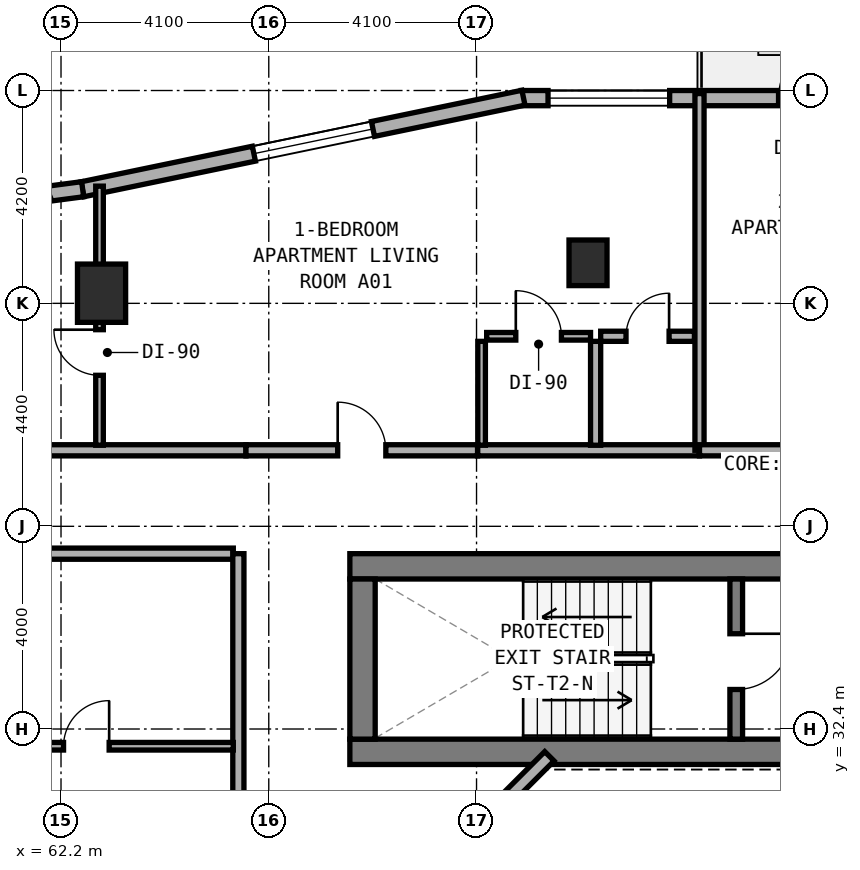
"""IFC4 building model, lengths in metres.
Left out: names, types, materials, properties, quantities, classifications, styles, units other than length and angle.
Written with IfcOpenShell. Run it as: python <this file> out.ifc"""

import sys

from ifc_helpers import new_model, si_unit, direction, frame, frame_2d, origin, origin_2d, place, context, subcontext, project, spatial, rectangle, extrude, element, fill, save


model = new_model("IFC4")
c1 = context("Model", 3, precision=1e-05, world=origin(), true_north=direction((0.0, 1.0)))
c2 = subcontext(c1, "Body", "Model", "MODEL_VIEW")
j1 = project(units=[si_unit("LENGTHUNIT", "METRE"), si_unit("PLANEANGLEUNIT", "RADIAN")], contexts=[c1])
p1 = place(None, origin())
s1 = spatial("IfcSite", under=j1, at=p1, CompositionType="ELEMENT")
p2 = place(p1, origin())
s2 = spatial("IfcBuilding", under=s1, at=p2, CompositionType="ELEMENT")
p3 = place(p2, frame((0.0, 0.0, 59.0)))
s3 = spatial("IfcBuildingStorey", under=s2, at=p3, CompositionType="ELEMENT", Elevation=59.0)
p4 = place(p3, frame((67.9, 31.95, 0.0), z_axis=(0.0, 0.0, 1.0), x_axis=(1.0, 0.0, 0.0)))
e1 = element("IfcWall", 1, at=p4, inside=s3, PredefinedType="SHEAR", context=c2, shape_type="SweptSolid", body=[
    extrude(rectangle(XDim=18.4, YDim=0.5, at=frame_2d((9.2, 0.0))), origin(), (0.0, 0.0, 1.0), 3.5),
])
p5 = place(p3, frame((67.9, 35.61, 0.0), z_axis=(0.0, 0.0, 1.0), x_axis=(1.0, 0.0, 0.0)))
e2 = element("IfcWall", 2, at=p5, inside=s3, PredefinedType="SHEAR", context=c2, shape_type="SweptSolid", body=[
    extrude(rectangle(XDim=18.4, YDim=0.5, at=frame_2d((9.2, 0.0))), origin(), (0.0, 0.0, 1.0), 3.5),
])
p6 = place(p5, frame((9.25, 0.0, 0.0)))
e3 = element("IfcOpeningElement", 3, at=p6, cuts=e2, PredefinedType="OPENING", context=c2, shape_type="SweptSolid", body=[
    extrude(rectangle(XDim=1.2, YDim=2.15, at=frame_2d((0.6, 1.075))), frame((0.0, 0.26, 0.0), z_axis=(0.0, -1.0, 0.0), x_axis=(1.0, 0.0, 0.0)), (0.0, 0.0, 1.0), 0.52),
])
p7 = place(p5, frame((16.85, 0.0, 0.0)))
e4 = element("IfcOpeningElement", 4, at=p7, cuts=e2, PredefinedType="OPENING", context=c2, shape_type="SweptSolid", body=[
    extrude(rectangle(XDim=0.85, YDim=2.1, at=frame_2d((0.425, 1.05))), frame((0.0, 0.26, 0.0), z_axis=(0.0, -1.0, 0.0), x_axis=(1.0, 0.0, 0.0)), (0.0, 0.0, 1.0), 0.52),
])
p8 = place(p3, frame((68.15, 32.2, 0.0), z_axis=(0.0, 0.0, 1.0), x_axis=(0.0, 1.0, 0.0)))
e5 = element("IfcWall", 5, at=p8, inside=s3, PredefinedType="SHEAR", context=c2, shape_type="SweptSolid", body=[
    extrude(rectangle(XDim=3.16, YDim=0.5, at=frame_2d((1.58, 0.0))), origin(), (0.0, 0.0, 1.0), 3.5),
])
p9 = place(p3, frame((75.525, 32.2, 0.0), z_axis=(0.0, 0.0, 1.0), x_axis=(0.0, 1.0, 0.0)))
e6 = element("IfcWall", 6, at=p9, inside=s3, PredefinedType="STANDARD", context=c2, shape_type="SweptSolid", body=[
    extrude(rectangle(XDim=3.16, YDim=0.25, at=frame_2d((1.58, 0.0))), origin(), (0.0, 0.0, 1.0), 3.25),
])
p10 = place(p9, frame((0.98, 0.0, 0.0)))
e7 = element("IfcOpeningElement", 7, at=p10, cuts=e6, PredefinedType="OPENING", context=c2, shape_type="SweptSolid", body=[
    extrude(rectangle(XDim=1.1, YDim=2.15, at=frame_2d((0.55, 1.075))), frame((0.0, 0.135, 0.0), z_axis=(0.0, -1.0, 0.0), x_axis=(1.0, 0.0, 0.0)), (0.0, 0.0, 1.0), 0.27),
])
p11 = place(p3, frame((72.6, 41.6, 0.0), z_axis=(0.0, 0.0, 1.0), x_axis=(1.0, 0.0, 0.0)))
e8 = element("IfcColumn", 8, at=p11, inside=s3, PredefinedType="COLUMN", context=c2, shape_type="SweptSolid", body=[
    extrude(rectangle(XDim=0.75, YDim=0.9, at=origin_2d()), origin(), (0.0, 0.0, 1.0), 3.5),
])
p12 = place(p3, frame((63.0, 41.0, 0.0), z_axis=(0.0, 0.0, 1.0), x_axis=(1.0, 0.0, 0.0)))
e9 = element("IfcColumn", 9, at=p12, inside=s3, PredefinedType="COLUMN", context=c2, shape_type="SweptSolid", body=[
    extrude(rectangle(XDim=0.95, YDim=1.15, at=origin_2d()), origin(), (0.0, 0.0, 1.0), 3.5),
])
p13 = place(p3, frame((82.673, 44.85, 0.0), z_axis=(0.0, 0.0, 1.0), x_axis=(-1.0, 0.0, 0.0)))
e10 = element("IfcWall", 10, at=p13, inside=s3, PredefinedType="STANDARD", context=c2, shape_type="SweptSolid", body=[
    extrude(rectangle(XDim=11.391, YDim=0.3, at=frame_2d((5.696, 0.0))), origin(), (0.0, 0.0, 1.0), 3.25),
])
p14 = place(p13, frame((5.113, 0.0, 0.0)))
e11 = element("IfcOpeningElement", 11, at=p14, cuts=e10, PredefinedType="OPENING", context=c2, shape_type="SweptSolid", body=[
    extrude(rectangle(XDim=1.2, YDim=2.15, at=frame_2d((0.6, 1.075))), frame((0.0, 0.16, 0.0), z_axis=(0.0, -1.0, 0.0), x_axis=(1.0, 0.0, 0.0)), (0.0, 0.0, 1.0), 0.32),
])
p15 = place(p13, frame((0.282, 0.0, 0.85)))
e12 = element("IfcOpeningElement", 12, at=p15, cuts=e10, PredefinedType="OPENING", context=c2, shape_type="SweptSolid", body=[
    extrude(rectangle(XDim=1.5, YDim=1.5, at=frame_2d((0.75, 0.75))), frame((0.0, 0.16, 0.0), z_axis=(0.0, -1.0, 0.0), x_axis=(1.0, 0.0, 0.0)), (0.0, 0.0, 1.0), 0.32),
])
p16 = place(p13, frame((2.793, 0.0, 0.85)))
e13 = element("IfcOpeningElement", 13, at=p16, cuts=e10, PredefinedType="OPENING", context=c2, shape_type="SweptSolid", body=[
    extrude(rectangle(XDim=1.5, YDim=1.5, at=frame_2d((0.75, 0.75))), frame((0.0, 0.16, 0.0), z_axis=(0.0, -1.0, 0.0), x_axis=(1.0, 0.0, 0.0)), (0.0, 0.0, 1.0), 0.32),
])
p17 = place(p13, frame((8.462, 0.0, 0.8)))
e14 = element("IfcOpeningElement", 14, at=p17, cuts=e10, PredefinedType="OPENING", context=c2, shape_type="SweptSolid", body=[
    extrude(rectangle(XDim=2.4, YDim=1.6, at=frame_2d((1.2, 0.8))), frame((0.0, 0.16, 0.0), z_axis=(0.0, -1.0, 0.0), x_axis=(1.0, 0.0, 0.0)), (0.0, 0.0, 1.0), 0.32),
])
p18 = place(p3, frame((71.326, 44.858, 0.0), z_axis=(0.0, 0.0, 1.0), x_axis=(-0.979124350489, -0.203262161453, 0.0)))
e15 = element("IfcWall", 15, at=p18, inside=s3, PredefinedType="STANDARD", context=c2, shape_type="SweptSolid", body=[
    extrude(rectangle(XDim=8.889, YDim=0.3, at=frame_2d((4.445, 0.0))), origin(), (0.0, 0.0, 1.0), 3.25),
])
p19 = place(p18, frame((3.033, 0.0, 0.8)))
e16 = element("IfcOpeningElement", 16, at=p19, cuts=e15, PredefinedType="OPENING", context=c2, shape_type="SweptSolid", body=[
    extrude(rectangle(XDim=2.4, YDim=1.6, at=frame_2d((1.2, 0.8))), frame((0.0, 0.16, 0.0), z_axis=(0.0, -1.0, 0.0), x_axis=(1.0, 0.0, 0.0)), (0.0, 0.0, 1.0), 0.32),
])
p20 = place(p3, frame((62.627, 43.052, 0.0), z_axis=(0.0, 0.0, 1.0), x_axis=(-0.991480488834, -0.130255288807, 0.0)))
e17 = element("IfcWall", 17, at=p20, inside=s3, PredefinedType="STANDARD", context=c2, shape_type="SweptSolid", body=[
    extrude(rectangle(XDim=0.729, YDim=0.3, at=frame_2d((0.365, 0.0))), origin(), (0.0, 0.0, 1.0), 3.25),
])
p21 = place(p3, frame((71.838, 31.862, 0.0), z_axis=(0.0, 0.0, 1.0), x_axis=(-0.707053950914, -0.707159607512, 0.0)))
e18 = element("IfcWall", 18, at=p21, inside=s3, PredefinedType="STANDARD", context=c2, shape_type="SweptSolid", body=[
    extrude(rectangle(XDim=2.311, YDim=0.26, at=frame_2d((1.155, 0.0))), origin(), (0.0, 0.0, 1.0), 3.25),
])
p22 = place(p3, frame((58.16, 37.9, 0.0), z_axis=(0.0, 0.0, 1.0), x_axis=(1.0, 0.0, 0.0)))
e19 = element("IfcWall", 19, at=p22, inside=s3, PredefinedType="SOLIDWALL", context=c2, shape_type="SweptSolid", body=[
    extrude(rectangle(XDim=7.69, YDim=0.22, at=frame_2d((3.845, 0.0))), origin(), (0.0, 0.0, 1.0), 2.865),
])
p23 = place(p3, frame((70.42, 37.9, 0.0), z_axis=(0.0, 0.0, 1.0), x_axis=(1.0, 0.0, 0.0)))
e20 = element("IfcWall", 20, at=p23, inside=s3, PredefinedType="SOLIDWALL", context=c2, shape_type="SweptSolid", body=[
    extrude(rectangle(XDim=4.38, YDim=0.22, at=frame_2d((2.19, 0.0))), origin(), (0.0, 0.0, 1.0), 2.725),
])
p24 = place(p3, frame((65.85, 37.9, 0.0), z_axis=(0.0, 0.0, 1.0), x_axis=(1.0, 0.0, 0.0)))
e21 = element("IfcWall", 21, at=p24, inside=s3, PredefinedType="SOLIDWALL", context=c2, shape_type="SweptSolid", body=[
    extrude(rectangle(XDim=4.57, YDim=0.22, at=frame_2d((2.285, 0.0))), origin(), (0.0, 0.0, 1.0), 3.22),
])
p25 = place(p24, frame((1.81, 0.0, 0.0)))
e22 = element("IfcOpeningElement", 22, at=p25, cuts=e21, PredefinedType="OPENING", context=c2, shape_type="SweptSolid", body=[
    extrude(rectangle(XDim=0.95, YDim=2.1, at=frame_2d((0.475, 1.05))), frame((0.0, 0.12, 0.0), z_axis=(0.0, -1.0, 0.0), x_axis=(1.0, 0.0, 0.0)), (0.0, 0.0, 1.0), 0.24),
])
p26 = place(p3, frame((62.96, 38.0, 0.0), z_axis=(0.0, 0.0, 1.0), x_axis=(0.0, 1.0, 0.0)))
e23 = element("IfcWall", 23, at=p26, inside=s3, PredefinedType="PARTITIONING", context=c2, shape_type="SweptSolid", body=[
    extrude(rectangle(XDim=5.113, YDim=0.15, at=frame_2d((2.557, 0.0))), origin(), (0.0, 0.0, 1.0), 2.865),
])
p27 = place(p26, frame((1.38, 0.0, 0.0)))
e24 = element("IfcOpeningElement", 24, at=p27, cuts=e23, PredefinedType="OPENING", context=c2, shape_type="SweptSolid", body=[
    extrude(rectangle(XDim=0.9, YDim=2.1, at=frame_2d((0.45, 1.05))), frame((0.0, 0.085, 0.0), z_axis=(0.0, -1.0, 0.0), x_axis=(1.0, 0.0, 0.0)), (0.0, 0.0, 1.0), 0.17),
])
p28 = place(p3, frame((72.75, 38.0, 0.0), z_axis=(0.0, 0.0, 1.0), x_axis=(0.0, 1.0, 0.0)))
e25 = element("IfcWall", 25, at=p28, inside=s3, PredefinedType="PLUMBINGWALL", context=c2, shape_type="SweptSolid", body=[
    extrude(rectangle(XDim=2.05, YDim=0.2, at=frame_2d((1.025, 0.0))), origin(), (0.0, 0.0, 1.0), 2.725),
])
p29 = place(p3, frame((70.5, 38.0, 0.0), z_axis=(0.0, 0.0, 1.0), x_axis=(0.0, 1.0, 0.0)))
e26 = element("IfcWall", 26, at=p29, inside=s3, PredefinedType="PARTITIONING", context=c2, shape_type="SweptSolid", body=[
    extrude(rectangle(XDim=2.05, YDim=0.15, at=frame_2d((1.025, 0.0))), origin(), (0.0, 0.0, 1.0), 3.22),
])
p30 = place(p3, frame((72.85, 40.15, 0.0), z_axis=(0.0, 0.0, 1.0), x_axis=(1.0, 0.0, 0.0)))
e27 = element("IfcWall", 27, at=p30, inside=s3, PredefinedType="PLUMBINGWALL", context=c2, shape_type="SweptSolid", body=[
    extrude(rectangle(XDim=1.85, YDim=0.2, at=frame_2d((0.925, 0.0))), origin(), (0.0, 0.0, 1.0), 3.22),
])
p31 = place(p30, frame((0.5, 0.0, 0.0)))
e28 = element("IfcOpeningElement", 28, at=p31, cuts=e27, PredefinedType="OPENING", context=c2, shape_type="SweptSolid", body=[
    extrude(rectangle(XDim=0.85, YDim=2.1, at=frame_2d((0.425, 1.05))), frame((0.0, 0.11, 0.0), z_axis=(0.0, -1.0, 0.0), x_axis=(1.0, 0.0, 0.0)), (0.0, 0.0, 1.0), 0.22),
])
p32 = place(p3, frame((70.6, 40.15, 0.0), z_axis=(0.0, 0.0, 1.0), x_axis=(1.0, 0.0, 0.0)))
e29 = element("IfcWall", 29, at=p32, inside=s3, PredefinedType="PARTITIONING", context=c2, shape_type="SweptSolid", body=[
    extrude(rectangle(XDim=2.05, YDim=0.15, at=frame_2d((1.025, 0.0))), origin(), (0.0, 0.0, 1.0), 2.725),
])
p33 = place(p32, frame((0.575, 0.0, 0.0)))
e30 = element("IfcOpeningElement", 30, at=p33, cuts=e29, PredefinedType="OPENING", context=c2, shape_type="SweptSolid", body=[
    extrude(rectangle(XDim=0.9, YDim=2.1, at=frame_2d((0.45, 1.05))), frame((0.0, 0.085, 0.0), z_axis=(0.0, -1.0, 0.0), x_axis=(1.0, 0.0, 0.0)), (0.0, 0.0, 1.0), 0.17),
])
p34 = place(p3, frame((74.8, 37.9, 0.0), z_axis=(0.0, 0.0, 1.0), x_axis=(0.0, 1.0, 0.0)))
e31 = element("IfcWall", 31, at=p34, inside=s3, PredefinedType="SOLIDWALL", context=c2, shape_type="SweptSolid", body=[
    extrude(rectangle(XDim=7.04, YDim=0.18, at=frame_2d((3.52, 0.0))), origin(), (0.0, 0.0, 1.0), 2.865),
])
p35 = place(p3, frame((74.8, 37.9, 0.0), z_axis=(0.0, 0.0, 1.0), x_axis=(1.0, 0.0, 0.0)))
e32 = element("IfcWall", 32, at=p35, inside=s3, PredefinedType="SOLIDWALL", context=c2, shape_type="SweptSolid", body=[
    extrude(rectangle(XDim=5.83, YDim=0.22, at=frame_2d((2.915, 0.0))), origin(), (0.0, 0.0, 1.0), 3.22),
])
p36 = place(p3, frame((58.32, 35.86, 0.0), z_axis=(0.0, 0.0, 1.0), x_axis=(1.0, 0.0, 0.0)))
e33 = element("IfcWall", 33, at=p36, inside=s3, PredefinedType="SOLIDWALL", context=c2, shape_type="SweptSolid", body=[
    extrude(rectangle(XDim=7.28, YDim=0.22, at=frame_2d((3.64, 0.0))), origin(), (0.0, 0.0, 1.0), 2.865),
])
p37 = place(p3, frame((65.7, 27.9, 0.0), z_axis=(0.0, 0.0, 1.0), x_axis=(0.0, 1.0, 0.0)))
e34 = element("IfcWall", 34, at=p37, inside=s3, PredefinedType="SOLIDWALL", context=c2, shape_type="SweptSolid", body=[
    extrude(rectangle(XDim=7.96, YDim=0.22, at=frame_2d((3.98, 0.0))), origin(), (0.0, 0.0, 1.0), 2.725),
])
p38 = place(p37, frame((1.605, 0.0, 0.0)))
e35 = element("IfcOpeningElement", 35, at=p38, cuts=e34, PredefinedType="OPENING", context=c2, shape_type="SweptSolid", body=[
    extrude(rectangle(XDim=0.95, YDim=2.1, at=frame_2d((0.475, 1.05))), frame((0.0, 0.12, 0.0), z_axis=(0.0, -1.0, 0.0), x_axis=(1.0, 0.0, 0.0)), (0.0, 0.0, 1.0), 0.24),
])
p39 = place(p3, frame((58.26, 32.06, 0.0), z_axis=(0.0, 0.0, 1.0), x_axis=(1.0, 0.0, 0.0)))
e36 = element("IfcWall", 36, at=p39, inside=s3, PredefinedType="PARTITIONING", context=c2, shape_type="SweptSolid", body=[
    extrude(rectangle(XDim=7.34, YDim=0.15, at=frame_2d((3.67, 0.0))), origin(), (0.0, 0.0, 1.0), 2.865),
])
p40 = place(p39, frame((3.99, 0.0, 0.0)))
e37 = element("IfcOpeningElement", 37, at=p40, cuts=e36, PredefinedType="OPENING", context=c2, shape_type="SweptSolid", body=[
    extrude(rectangle(XDim=0.9, YDim=2.1, at=frame_2d((0.45, 1.05))), frame((0.0, 0.085, 0.0), z_axis=(0.0, -1.0, 0.0), x_axis=(1.0, 0.0, 0.0)), (0.0, 0.0, 1.0), 0.17),
])
p41 = place(p14, frame((1.2, 0.0, 0.0), z_axis=(0.0, 0.0, 1.0), x_axis=(-1.0, 0.0, 0.0)))
e38 = element("IfcDoor", 38, at=p41, inside=s3, OperationType="SINGLE_SWING_RIGHT", PredefinedType="DOOR", context=c2, shape_type="SweptSolid", body=[
    extrude(rectangle(XDim=1.2, YDim=2.15, at=frame_2d((0.6, 1.075))), frame((0.0, 0.025, 0.0), z_axis=(0.0, -1.0, 0.0), x_axis=(1.0, 0.0, 0.0)), (0.0, 0.0, 1.0), 0.05),
])
fill(e11, e38)
p42 = place(p17, origin())
e39 = element("IfcWindow", 39, at=p42, inside=s3, PartitioningType="SINGLE_PANEL", PredefinedType="WINDOW", context=c2, shape_type="SweptSolid", body=[
    extrude(rectangle(XDim=2.4, YDim=1.6, at=frame_2d((1.2, 0.8))), frame((0.0, 0.03, 0.0), z_axis=(0.0, -1.0, 0.0), x_axis=(1.0, 0.0, 0.0)), (0.0, 0.0, 1.0), 0.06),
])
fill(e14, e39)
p43 = place(p19, origin())
e40 = element("IfcWindow", 40, at=p43, inside=s3, PartitioningType="SINGLE_PANEL", PredefinedType="WINDOW", context=c2, shape_type="SweptSolid", body=[
    extrude(rectangle(XDim=2.4, YDim=1.6, at=frame_2d((1.2, 0.8))), frame((0.0, 0.03, 0.0), z_axis=(0.0, -1.0, 0.0), x_axis=(1.0, 0.0, 0.0)), (0.0, 0.0, 1.0), 0.06),
])
fill(e16, e40)
p44 = place(p10, frame((1.1, 0.0, 0.0), z_axis=(0.0, 0.0, 1.0), x_axis=(-1.0, 0.0, 0.0)))
e41 = element("IfcDoor", 41, at=p44, inside=s3, OperationType="SINGLE_SWING_LEFT", PredefinedType="DOOR", context=c2, shape_type="SweptSolid", body=[
    extrude(rectangle(XDim=1.1, YDim=2.15, at=frame_2d((0.55, 1.075))), frame((0.0, 0.025, 0.0), z_axis=(0.0, -1.0, 0.0), x_axis=(1.0, 0.0, 0.0)), (0.0, 0.0, 1.0), 0.05),
])
fill(e7, e41)
p45 = place(p25, origin())
e42 = element("IfcDoor", 42, at=p45, inside=s3, OperationType="SINGLE_SWING_LEFT", PredefinedType="DOOR", context=c2, shape_type="SweptSolid", body=[
    extrude(rectangle(XDim=0.95, YDim=2.1, at=frame_2d((0.475, 1.05))), frame((0.0, 0.025, 0.0), z_axis=(0.0, -1.0, 0.0), x_axis=(1.0, 0.0, 0.0)), (0.0, 0.0, 1.0), 0.05),
])
fill(e22, e42)
p46 = place(p27, origin())
e43 = element("IfcDoor", 43, at=p46, inside=s3, OperationType="SINGLE_SWING_RIGHT", PredefinedType="DOOR", context=c2, shape_type="SweptSolid", body=[
    extrude(rectangle(XDim=0.9, YDim=2.1, at=frame_2d((0.45, 1.05))), frame((0.0, 0.025, 0.0), z_axis=(0.0, -1.0, 0.0), x_axis=(1.0, 0.0, 0.0)), (0.0, 0.0, 1.0), 0.05),
])
fill(e24, e43)
p47 = place(p31, origin())
e44 = element("IfcDoor", 44, at=p47, inside=s3, OperationType="SINGLE_SWING_RIGHT", PredefinedType="DOOR", context=c2, shape_type="SweptSolid", body=[
    extrude(rectangle(XDim=0.85, YDim=2.1, at=frame_2d((0.425, 1.05))), frame((0.0, 0.025, 0.0), z_axis=(0.0, -1.0, 0.0), x_axis=(1.0, 0.0, 0.0)), (0.0, 0.0, 1.0), 0.05),
])
fill(e28, e44)
p48 = place(p33, origin())
e45 = element("IfcDoor", 45, at=p48, inside=s3, OperationType="SINGLE_SWING_LEFT", PredefinedType="DOOR", context=c2, shape_type="SweptSolid", body=[
    extrude(rectangle(XDim=0.9, YDim=2.1, at=frame_2d((0.45, 1.05))), frame((0.0, 0.025, 0.0), z_axis=(0.0, -1.0, 0.0), x_axis=(1.0, 0.0, 0.0)), (0.0, 0.0, 1.0), 0.05),
])
fill(e30, e45)
p49 = place(p40, origin())
e46 = element("IfcDoor", 46, at=p49, inside=s3, OperationType="SINGLE_SWING_RIGHT", PredefinedType="DOOR", context=c2, shape_type="SweptSolid", body=[
    extrude(rectangle(XDim=0.9, YDim=2.1, at=frame_2d((0.45, 1.05))), frame((0.0, 0.025, 0.0), z_axis=(0.0, -1.0, 0.0), x_axis=(1.0, 0.0, 0.0)), (0.0, 0.0, 1.0), 0.05),
])
fill(e37, e46)
save(model, sys.argv[1])
